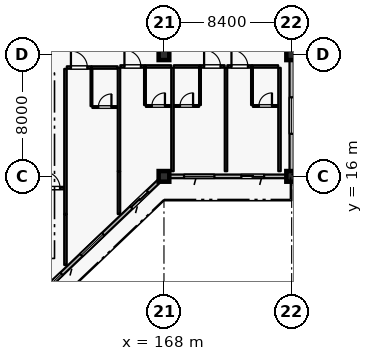
"""IFC4 building model, lengths in metres.
Left out: names, types, materials, properties, quantities, classifications, styles, units other than length and angle.
Written with IfcOpenShell. Run it as: python <this file> out.ifc"""

import sys

from ifc_helpers import new_model, si_unit, direction, frame, frame_2d, origin, origin_2d, place, context, subcontext, project, spatial, rectangle, extrude, element, fill, save


model = new_model("IFC4")
c1 = context("Model", 3, precision=1e-05, world=origin(), true_north=direction((0.0, 1.0)))
c2 = subcontext(c1, "Body", "Model", "MODEL_VIEW")
j1 = project(units=[si_unit("LENGTHUNIT", "METRE"), si_unit("PLANEANGLEUNIT", "RADIAN")], contexts=[c1])
p1 = place(None, origin())
s1 = spatial("IfcSite", under=j1, at=p1, CompositionType="ELEMENT")
p2 = place(p1, origin())
s2 = spatial("IfcBuilding", under=s1, at=p2, CompositionType="ELEMENT")
p3 = place(p2, frame((0.0, 0.0, 28.8)))
s3 = spatial("IfcBuildingStorey", under=s2, at=p3, CompositionType="ELEMENT", Elevation=28.8)
for number, where, z_axis, x_axis in (
    (1, (168.0, 16.0, 0.0), (0.0, 0.0, 1.0), (1.0, 0.0, 0.0)),
    (2, (176.4, 16.0, 0.0), (0.0, 0.0, 1.0), (1.0, 0.0, 0.0)),
    (3, (168.0, 24.0, 0.0), (0.0, 0.0, 1.0), (1.0, 0.0, 0.0)),
    (4, (176.4, 24.0, 0.0), (0.0, 0.0, 1.0), (1.0, 0.0, 0.0)),
):
    element("IfcColumn", number, at=place(p3, frame(where, z_axis=z_axis, x_axis=x_axis)), inside=s3, PredefinedType="COLUMN", context=c2, shape_type="SweptSolid", body=[
        extrude(rectangle(XDim=0.7, YDim=0.7, at=origin_2d()), origin(), (0.0, 0.0, 1.0), 3.6),
    ])
p4 = place(p3, frame((167.65, 15.667, 0.0), z_axis=(0.0, 0.0, 1.0), x_axis=(-0.724105170588, -0.689689569247, 0.0)))
e5 = element("IfcWall", 5, at=p4, inside=s3, PredefinedType="SOLIDWALL", context=c2, shape_type="SweptSolid", body=[
    extrude(rectangle(XDim=10.634, YDim=0.24, at=frame_2d((5.317, 0.0))), origin(), (0.0, 0.0, 1.0), 2.93),
])
p5 = place(p4, frame((0.983, 0.0, 0.0)))
e6 = element("IfcOpeningElement", 6, at=p5, cuts=e5, PredefinedType="OPENING", context=c2, shape_type="SweptSolid", body=[
    extrude(rectangle(XDim=1.5, YDim=2.25, at=frame_2d((0.75, 1.125))), frame((0.0, 0.13, 0.0), z_axis=(0.0, -1.0, 0.0), x_axis=(1.0, 0.0, 0.0)), (0.0, 0.0, 1.0), 0.26),
])
p6 = place(p4, frame((5.035, 0.0, 0.8)))
e7 = element("IfcOpeningElement", 7, at=p6, cuts=e5, PredefinedType="OPENING", context=c2, shape_type="SweptSolid", body=[
    extrude(rectangle(XDim=2.0, YDim=1.75, at=frame_2d((1.0, 0.875))), frame((0.0, 0.13, 0.0), z_axis=(0.0, -1.0, 0.0), x_axis=(1.0, 0.0, 0.0)), (0.0, 0.0, 1.0), 0.26),
])
p7 = place(p4, frame((8.819, 0.0, 0.8)))
e8 = element("IfcOpeningElement", 8, at=p7, cuts=e5, PredefinedType="OPENING", context=c2, shape_type="SweptSolid", body=[
    extrude(rectangle(XDim=1.6, YDim=1.6, at=frame_2d((0.8, 0.8))), frame((0.0, 0.13, 0.0), z_axis=(0.0, -1.0, 0.0), x_axis=(1.0, 0.0, 0.0)), (0.0, 0.0, 1.0), 0.26),
])
p8 = place(p3, frame((176.05, 16.0, 0.0), z_axis=(0.0, 0.0, 1.0), x_axis=(-1.0, 0.0, 0.0)))
e9 = element("IfcWall", 9, at=p8, inside=s3, PredefinedType="SOLIDWALL", context=c2, shape_type="SweptSolid", body=[
    extrude(rectangle(XDim=7.7, YDim=0.24, at=frame_2d((3.85, 0.0))), origin(), (0.0, 0.0, 1.0), 2.93),
])
p9 = place(p8, frame((1.46, 0.0, 0.0)))
e10 = element("IfcOpeningElement", 10, at=p9, cuts=e9, PredefinedType="OPENING", context=c2, shape_type="SweptSolid", body=[
    extrude(rectangle(XDim=1.5, YDim=2.25, at=frame_2d((0.75, 1.125))), frame((0.0, 0.13, 0.0), z_axis=(0.0, -1.0, 0.0), x_axis=(1.0, 0.0, 0.0)), (0.0, 0.0, 1.0), 0.26),
])
p10 = place(p8, frame((4.73, 0.0, 0.8)))
e11 = element("IfcOpeningElement", 11, at=p10, cuts=e9, PredefinedType="OPENING", context=c2, shape_type="SweptSolid", body=[
    extrude(rectangle(XDim=2.0, YDim=1.75, at=frame_2d((1.0, 0.875))), frame((0.0, 0.13, 0.0), z_axis=(0.0, -1.0, 0.0), x_axis=(1.0, 0.0, 0.0)), (0.0, 0.0, 1.0), 0.26),
])
p11 = place(p3, frame((176.4, 23.65, 0.0), z_axis=(0.0, 0.0, 1.0), x_axis=(0.0, -1.0, 0.0)))
e12 = element("IfcWall", 12, at=p11, inside=s3, PredefinedType="SOLIDWALL", context=c2, shape_type="SweptSolid", body=[
    extrude(rectangle(XDim=7.3, YDim=0.28, at=frame_2d((3.65, 0.0))), origin(), (0.0, 0.0, 1.0), 2.7),
])
p12 = place(p11, frame((2.45, 0.0, 0.5)))
e13 = element("IfcOpeningElement", 13, at=p12, cuts=e12, PredefinedType="OPENING", context=c2, shape_type="SweptSolid", body=[
    extrude(rectangle(XDim=2.4, YDim=1.65, at=frame_2d((1.2, 0.825))), frame((0.0, 0.15, 0.0), z_axis=(0.0, -1.0, 0.0), x_axis=(1.0, 0.0, 0.0)), (0.0, 0.0, 1.0), 0.3),
])
p13 = place(p3, frame((159.81, 15.23, 0.0), z_axis=(0.0, 0.0, 1.0), x_axis=(1.0, 0.0, 0.0)))
e14 = element("IfcWall", 14, at=p13, inside=s3, PredefinedType="PARTITIONING", context=c2, shape_type="SweptSolid", body=[
    extrude(rectangle(XDim=1.62, YDim=0.16, at=frame_2d((0.81, 0.0))), origin(), (0.0, 0.0, 1.0), 3.365),
])
p14 = place(p13, frame((0.27, 0.0, 0.0)))
e15 = element("IfcOpeningElement", 15, at=p14, cuts=e14, PredefinedType="OPENING", context=c2, shape_type="SweptSolid", body=[
    extrude(rectangle(XDim=1.08, YDim=2.3, at=frame_2d((0.54, 1.15))), frame((0.0, 0.09, 0.0), z_axis=(0.0, -1.0, 0.0), x_axis=(1.0, 0.0, 0.0)), (0.0, 0.0, 1.0), 0.18),
])
p15 = place(p3, frame((161.52, 10.17, 0.0), z_axis=(0.0, 0.0, 1.0), x_axis=(0.0, 1.0, 0.0)))
e16 = element("IfcWall", 16, at=p15, inside=s3, PredefinedType="PARTITIONING", context=c2, shape_type="SweptSolid", body=[
    extrude(rectangle(XDim=3.34, YDim=0.16, at=frame_2d((1.67, 0.0))), origin(), (0.0, 0.0, 1.0), 3.365),
])
p16 = place(p3, frame((161.61, 23.16, 0.0), z_axis=(0.0, 0.0, 1.0), x_axis=(1.0, 0.0, 0.0)))
e17 = element("IfcWall", 17, at=p16, inside=s3, PredefinedType="PARTITIONING", context=c2, shape_type="SweptSolid", body=[
    extrude(rectangle(XDim=1.62, YDim=0.16, at=frame_2d((0.81, 0.0))), origin(), (0.0, 0.0, 1.0), 3.365),
])
p17 = place(p16, frame((0.27, 0.0, 0.0)))
e18 = element("IfcOpeningElement", 18, at=p17, cuts=e17, PredefinedType="OPENING", context=c2, shape_type="SweptSolid", body=[
    extrude(rectangle(XDim=1.08, YDim=2.3, at=frame_2d((0.54, 1.15))), frame((0.0, 0.09, 0.0), z_axis=(0.0, -1.0, 0.0), x_axis=(1.0, 0.0, 0.0)), (0.0, 0.0, 1.0), 0.18),
])
p18 = place(p3, frame((163.24, 23.16, 0.0), z_axis=(0.0, 0.0, 1.0), x_axis=(1.0, 0.0, 0.0)))
e19 = element("IfcWall", 19, at=p18, inside=s3, PredefinedType="PARTITIONING", context=c2, shape_type="SweptSolid", body=[
    extrude(rectangle(XDim=1.71, YDim=0.16, at=frame_2d((0.855, 0.0))), origin(), (0.0, 0.0, 1.0), 3.365),
])
p19 = place(p3, frame((163.23, 20.62, 0.0), z_axis=(0.0, 0.0, 1.0), x_axis=(0.0, 1.0, 0.0)))
e20 = element("IfcWall", 20, at=p19, inside=s3, PredefinedType="PARTITIONING", context=c2, shape_type="SweptSolid", body=[
    extrude(rectangle(XDim=2.45, YDim=0.115, at=frame_2d((1.225, 0.0))), origin(), (0.0, 0.0, 1.0), 3.365),
])
p20 = place(p3, frame((163.29, 20.56, 0.0), z_axis=(0.0, 0.0, 1.0), x_axis=(1.0, 0.0, 0.0)))
e21 = element("IfcWall", 21, at=p20, inside=s3, PredefinedType="PARTITIONING", context=c2, shape_type="SweptSolid", body=[
    extrude(rectangle(XDim=1.65, YDim=0.115, at=frame_2d((0.825, 0.0))), origin(), (0.0, 0.0, 1.0), 3.365),
])
p21 = place(p20, frame((0.395, 0.0, 0.0)))
e22 = element("IfcOpeningElement", 22, at=p21, cuts=e21, PredefinedType="OPENING", context=c2, shape_type="SweptSolid", body=[
    extrude(rectangle(XDim=0.86, YDim=2.12, at=frame_2d((0.43, 1.06))), frame((0.0, 0.067, 0.0), z_axis=(0.0, -1.0, 0.0), x_axis=(1.0, 0.0, 0.0)), (0.0, 0.0, 1.0), 0.135),
])
p22 = place(p3, frame((161.52, 13.52, 0.0), z_axis=(0.0, 0.0, 1.0), x_axis=(0.0, 1.0, 0.0)))
e23 = element("IfcWall", 23, at=p22, inside=s3, PredefinedType="PARTITIONING", context=c2, shape_type="SweptSolid", body=[
    extrude(rectangle(XDim=9.55, YDim=0.16, at=frame_2d((4.775, 0.0))), origin(), (0.0, 0.0, 1.0), 3.365),
])
p23 = place(p3, frame((165.04, 13.52, 0.0), z_axis=(0.0, 0.0, 1.0), x_axis=(0.0, 1.0, 0.0)))
e24 = element("IfcWall", 24, at=p23, inside=s3, PredefinedType="PARTITIONING", context=c2, shape_type="SweptSolid", body=[
    extrude(rectangle(XDim=2.81, YDim=0.16, at=frame_2d((1.405, 0.0))), origin(), (0.0, 0.0, 1.0), 3.365),
])
p24 = place(p3, frame((165.13, 23.23, 0.0), z_axis=(0.0, 0.0, 1.0), x_axis=(1.0, 0.0, 0.0)))
e25 = element("IfcWall", 25, at=p24, inside=s3, PredefinedType="PARTITIONING", context=c2, shape_type="SweptSolid", body=[
    extrude(rectangle(XDim=1.62, YDim=0.16, at=frame_2d((0.81, 0.0))), origin(), (0.0, 0.0, 1.0), 3.365),
])
p25 = place(p24, frame((0.27, 0.0, 0.0)))
e26 = element("IfcOpeningElement", 26, at=p25, cuts=e25, PredefinedType="OPENING", context=c2, shape_type="SweptSolid", body=[
    extrude(rectangle(XDim=1.08, YDim=2.3, at=frame_2d((0.54, 1.15))), frame((0.0, 0.09, 0.0), z_axis=(0.0, -1.0, 0.0), x_axis=(1.0, 0.0, 0.0)), (0.0, 0.0, 1.0), 0.18),
])
p26 = place(p3, frame((166.76, 23.23, 0.0), z_axis=(0.0, 0.0, 1.0), x_axis=(1.0, 0.0, 0.0)))
e27 = element("IfcWall", 27, at=p26, inside=s3, PredefinedType="PARTITIONING", context=c2, shape_type="SweptSolid", body=[
    extrude(rectangle(XDim=1.71, YDim=0.16, at=frame_2d((0.855, 0.0))), origin(), (0.0, 0.0, 1.0), 3.365),
])
p27 = place(p3, frame((166.75, 20.69, 0.0), z_axis=(0.0, 0.0, 1.0), x_axis=(0.0, 1.0, 0.0)))
e28 = element("IfcWall", 28, at=p27, inside=s3, PredefinedType="PARTITIONING", context=c2, shape_type="SweptSolid", body=[
    extrude(rectangle(XDim=2.45, YDim=0.115, at=frame_2d((1.225, 0.0))), origin(), (0.0, 0.0, 1.0), 3.365),
])
p28 = place(p3, frame((166.81, 20.63, 0.0), z_axis=(0.0, 0.0, 1.0), x_axis=(1.0, 0.0, 0.0)))
e29 = element("IfcWall", 29, at=p28, inside=s3, PredefinedType="PARTITIONING", context=c2, shape_type="SweptSolid", body=[
    extrude(rectangle(XDim=1.65, YDim=0.115, at=frame_2d((0.825, 0.0))), origin(), (0.0, 0.0, 1.0), 3.365),
])
p29 = place(p28, frame((0.395, 0.0, 0.0)))
e30 = element("IfcOpeningElement", 30, at=p29, cuts=e29, PredefinedType="OPENING", context=c2, shape_type="SweptSolid", body=[
    extrude(rectangle(XDim=0.86, YDim=2.12, at=frame_2d((0.43, 1.06))), frame((0.0, 0.067, 0.0), z_axis=(0.0, -1.0, 0.0), x_axis=(1.0, 0.0, 0.0)), (0.0, 0.0, 1.0), 0.135),
])
p30 = place(p3, frame((165.04, 16.34, 0.0), z_axis=(0.0, 0.0, 1.0), x_axis=(0.0, 1.0, 0.0)))
e31 = element("IfcWall", 31, at=p30, inside=s3, PredefinedType="PARTITIONING", context=c2, shape_type="SweptSolid", body=[
    extrude(rectangle(XDim=6.8, YDim=0.16, at=frame_2d((3.4, 0.0))), origin(), (0.0, 0.0, 1.0), 3.365),
])
p31 = place(p3, frame((168.65, 23.23, 0.0), z_axis=(0.0, 0.0, 1.0), x_axis=(1.0, 0.0, 0.0)))
e32 = element("IfcWall", 32, at=p31, inside=s3, PredefinedType="PARTITIONING", context=c2, shape_type="SweptSolid", body=[
    extrude(rectangle(XDim=1.71, YDim=0.16, at=frame_2d((0.855, 0.0))), origin(), (0.0, 0.0, 1.0), 3.365),
])
p32 = place(p3, frame((170.37, 23.23, 0.0), z_axis=(0.0, 0.0, 1.0), x_axis=(1.0, 0.0, 0.0)))
e33 = element("IfcWall", 33, at=p32, inside=s3, PredefinedType="PARTITIONING", context=c2, shape_type="SweptSolid", body=[
    extrude(rectangle(XDim=1.62, YDim=0.16, at=frame_2d((0.81, 0.0))), origin(), (0.0, 0.0, 1.0), 3.365),
])
p33 = place(p32, frame((0.27, 0.0, 0.0)))
e34 = element("IfcOpeningElement", 34, at=p33, cuts=e33, PredefinedType="OPENING", context=c2, shape_type="SweptSolid", body=[
    extrude(rectangle(XDim=1.08, YDim=2.3, at=frame_2d((0.54, 1.15))), frame((0.0, 0.09, 0.0), z_axis=(0.0, -1.0, 0.0), x_axis=(1.0, 0.0, 0.0)), (0.0, 0.0, 1.0), 0.18),
])
p34 = place(p3, frame((170.37, 20.69, 0.0), z_axis=(0.0, 0.0, 1.0), x_axis=(0.0, 1.0, 0.0)))
e35 = element("IfcWall", 35, at=p34, inside=s3, PredefinedType="PARTITIONING", context=c2, shape_type="SweptSolid", body=[
    extrude(rectangle(XDim=2.45, YDim=0.115, at=frame_2d((1.225, 0.0))), origin(), (0.0, 0.0, 1.0), 3.365),
])
p35 = place(p3, frame((168.66, 20.63, 0.0), z_axis=(0.0, 0.0, 1.0), x_axis=(1.0, 0.0, 0.0)))
e36 = element("IfcWall", 36, at=p35, inside=s3, PredefinedType="PARTITIONING", context=c2, shape_type="SweptSolid", body=[
    extrude(rectangle(XDim=1.65, YDim=0.115, at=frame_2d((0.825, 0.0))), origin(), (0.0, 0.0, 1.0), 3.365),
])
p36 = place(p35, frame((0.395, 0.0, 0.0)))
e37 = element("IfcOpeningElement", 37, at=p36, cuts=e36, PredefinedType="OPENING", context=c2, shape_type="SweptSolid", body=[
    extrude(rectangle(XDim=0.86, YDim=2.12, at=frame_2d((0.43, 1.06))), frame((0.0, 0.067, 0.0), z_axis=(0.0, -1.0, 0.0), x_axis=(1.0, 0.0, 0.0)), (0.0, 0.0, 1.0), 0.135),
])
p37 = place(p3, frame((168.56, 16.34, 0.0), z_axis=(0.0, 0.0, 1.0), x_axis=(0.0, 1.0, 0.0)))
e38 = element("IfcWall", 38, at=p37, inside=s3, PredefinedType="PARTITIONING", context=c2, shape_type="SweptSolid", body=[
    extrude(rectangle(XDim=6.8, YDim=0.16, at=frame_2d((3.4, 0.0))), origin(), (0.0, 0.0, 1.0), 3.365),
])
p38 = place(p3, frame((172.17, 23.23, 0.0), z_axis=(0.0, 0.0, 1.0), x_axis=(1.0, 0.0, 0.0)))
e39 = element("IfcWall", 39, at=p38, inside=s3, PredefinedType="PARTITIONING", context=c2, shape_type="SweptSolid", body=[
    extrude(rectangle(XDim=1.62, YDim=0.16, at=frame_2d((0.81, 0.0))), origin(), (0.0, 0.0, 1.0), 3.365),
])
p39 = place(p38, frame((0.27, 0.0, 0.0)))
e40 = element("IfcOpeningElement", 40, at=p39, cuts=e39, PredefinedType="OPENING", context=c2, shape_type="SweptSolid", body=[
    extrude(rectangle(XDim=1.08, YDim=2.3, at=frame_2d((0.54, 1.15))), frame((0.0, 0.09, 0.0), z_axis=(0.0, -1.0, 0.0), x_axis=(1.0, 0.0, 0.0)), (0.0, 0.0, 1.0), 0.18),
])
p40 = place(p3, frame((173.8, 23.23, 0.0), z_axis=(0.0, 0.0, 1.0), x_axis=(1.0, 0.0, 0.0)))
e41 = element("IfcWall", 41, at=p40, inside=s3, PredefinedType="PARTITIONING", context=c2, shape_type="SweptSolid", body=[
    extrude(rectangle(XDim=1.71, YDim=0.16, at=frame_2d((0.855, 0.0))), origin(), (0.0, 0.0, 1.0), 3.365),
])
p41 = place(p3, frame((173.79, 20.69, 0.0), z_axis=(0.0, 0.0, 1.0), x_axis=(0.0, 1.0, 0.0)))
e42 = element("IfcWall", 42, at=p41, inside=s3, PredefinedType="PARTITIONING", context=c2, shape_type="SweptSolid", body=[
    extrude(rectangle(XDim=2.45, YDim=0.115, at=frame_2d((1.225, 0.0))), origin(), (0.0, 0.0, 1.0), 3.365),
])
p42 = place(p3, frame((173.85, 20.63, 0.0), z_axis=(0.0, 0.0, 1.0), x_axis=(1.0, 0.0, 0.0)))
e43 = element("IfcWall", 43, at=p42, inside=s3, PredefinedType="PARTITIONING", context=c2, shape_type="SweptSolid", body=[
    extrude(rectangle(XDim=1.65, YDim=0.115, at=frame_2d((0.825, 0.0))), origin(), (0.0, 0.0, 1.0), 3.365),
])
p43 = place(p42, frame((0.395, 0.0, 0.0)))
e44 = element("IfcOpeningElement", 44, at=p43, cuts=e43, PredefinedType="OPENING", context=c2, shape_type="SweptSolid", body=[
    extrude(rectangle(XDim=0.86, YDim=2.12, at=frame_2d((0.43, 1.06))), frame((0.0, 0.067, 0.0), z_axis=(0.0, -1.0, 0.0), x_axis=(1.0, 0.0, 0.0)), (0.0, 0.0, 1.0), 0.135),
])
for number, where, z_axis, x_axis in (
    (45, (172.08, 16.34, 0.0), (0.0, 0.0, 1.0), (0.0, 1.0, 0.0)),
    (46, (175.6, 16.34, 0.0), (0.0, 0.0, 1.0), (0.0, 1.0, 0.0)),
):
    element("IfcWall", number, at=place(p3, frame(where, z_axis=z_axis, x_axis=x_axis)), inside=s3, PredefinedType="PARTITIONING", context=c2, shape_type="SweptSolid", body=[
        extrude(rectangle(XDim=6.8, YDim=0.16, at=frame_2d((3.4, 0.0))), origin(), (0.0, 0.0, 1.0), 3.365),
    ])
p44 = place(p5, origin())
e47 = element("IfcDoor", 47, at=p44, inside=s3, OperationType="SLIDING_TO_LEFT", PredefinedType="DOOR", context=c2, shape_type="SweptSolid", body=[
    extrude(rectangle(XDim=1.5, YDim=2.25, at=frame_2d((0.75, 1.125))), frame((0.0, 0.025, 0.0), z_axis=(0.0, -1.0, 0.0), x_axis=(1.0, 0.0, 0.0)), (0.0, 0.0, 1.0), 0.05),
])
fill(e6, e47)
p45 = place(p6, origin())
e48 = element("IfcWindow", 48, at=p45, inside=s3, PartitioningType="DOUBLE_PANEL_VERTICAL", PredefinedType="WINDOW", context=c2, shape_type="SweptSolid", body=[
    extrude(rectangle(XDim=2.0, YDim=1.75, at=frame_2d((1.0, 0.875))), frame((0.0, 0.03, 0.0), z_axis=(0.0, -1.0, 0.0), x_axis=(1.0, 0.0, 0.0)), (0.0, 0.0, 1.0), 0.06),
])
fill(e7, e48)
p46 = place(p7, origin())
e49 = element("IfcWindow", 49, at=p46, inside=s3, PartitioningType="SINGLE_PANEL", PredefinedType="WINDOW", context=c2, shape_type="SweptSolid", body=[
    extrude(rectangle(XDim=1.6, YDim=1.6, at=frame_2d((0.8, 0.8))), frame((0.0, 0.03, 0.0), z_axis=(0.0, -1.0, 0.0), x_axis=(1.0, 0.0, 0.0)), (0.0, 0.0, 1.0), 0.06),
])
fill(e8, e49)
p47 = place(p9, origin())
e50 = element("IfcDoor", 50, at=p47, inside=s3, OperationType="SLIDING_TO_LEFT", PredefinedType="DOOR", context=c2, shape_type="SweptSolid", body=[
    extrude(rectangle(XDim=1.5, YDim=2.25, at=frame_2d((0.75, 1.125))), frame((0.0, 0.025, 0.0), z_axis=(0.0, -1.0, 0.0), x_axis=(1.0, 0.0, 0.0)), (0.0, 0.0, 1.0), 0.05),
])
fill(e10, e50)
p48 = place(p10, origin())
e51 = element("IfcWindow", 51, at=p48, inside=s3, PartitioningType="DOUBLE_PANEL_VERTICAL", PredefinedType="WINDOW", context=c2, shape_type="SweptSolid", body=[
    extrude(rectangle(XDim=2.0, YDim=1.75, at=frame_2d((1.0, 0.875))), frame((0.0, 0.03, 0.0), z_axis=(0.0, -1.0, 0.0), x_axis=(1.0, 0.0, 0.0)), (0.0, 0.0, 1.0), 0.06),
])
fill(e11, e51)
p49 = place(p12, origin())
e52 = element("IfcWindow", 52, at=p49, inside=s3, PartitioningType="DOUBLE_PANEL_VERTICAL", PredefinedType="WINDOW", context=c2, shape_type="SweptSolid", body=[
    extrude(rectangle(XDim=2.4, YDim=1.65, at=frame_2d((1.2, 0.825))), frame((0.0, 0.03, 0.0), z_axis=(0.0, -1.0, 0.0), x_axis=(1.0, 0.0, 0.0)), (0.0, 0.0, 1.0), 0.06),
])
fill(e13, e52)
p50 = place(p14, origin())
e53 = element("IfcDoor", 53, at=p50, inside=s3, OperationType="SINGLE_SWING_LEFT", PredefinedType="DOOR", context=c2, shape_type="SweptSolid", body=[
    extrude(rectangle(XDim=1.08, YDim=2.3, at=frame_2d((0.54, 1.15))), frame((0.0, 0.025, 0.0), z_axis=(0.0, -1.0, 0.0), x_axis=(1.0, 0.0, 0.0)), (0.0, 0.0, 1.0), 0.05),
])
fill(e15, e53)
p51 = place(p17, origin())
e54 = element("IfcDoor", 54, at=p51, inside=s3, OperationType="SINGLE_SWING_LEFT", PredefinedType="DOOR", context=c2, shape_type="SweptSolid", body=[
    extrude(rectangle(XDim=1.08, YDim=2.3, at=frame_2d((0.54, 1.15))), frame((0.0, 0.025, 0.0), z_axis=(0.0, -1.0, 0.0), x_axis=(1.0, 0.0, 0.0)), (0.0, 0.0, 1.0), 0.05),
])
fill(e18, e54)
p52 = place(p21, origin())
e55 = element("IfcDoor", 55, at=p52, inside=s3, OperationType="SINGLE_SWING_RIGHT", PredefinedType="DOOR", context=c2, shape_type="SweptSolid", body=[
    extrude(rectangle(XDim=0.86, YDim=2.12, at=frame_2d((0.43, 1.06))), frame((0.0, 0.025, 0.0), z_axis=(0.0, -1.0, 0.0), x_axis=(1.0, 0.0, 0.0)), (0.0, 0.0, 1.0), 0.05),
])
fill(e22, e55)
p53 = place(p25, origin())
e56 = element("IfcDoor", 56, at=p53, inside=s3, OperationType="SINGLE_SWING_LEFT", PredefinedType="DOOR", context=c2, shape_type="SweptSolid", body=[
    extrude(rectangle(XDim=1.08, YDim=2.3, at=frame_2d((0.54, 1.15))), frame((0.0, 0.025, 0.0), z_axis=(0.0, -1.0, 0.0), x_axis=(1.0, 0.0, 0.0)), (0.0, 0.0, 1.0), 0.05),
])
fill(e26, e56)
p54 = place(p29, origin())
e57 = element("IfcDoor", 57, at=p54, inside=s3, OperationType="SINGLE_SWING_RIGHT", PredefinedType="DOOR", context=c2, shape_type="SweptSolid", body=[
    extrude(rectangle(XDim=0.86, YDim=2.12, at=frame_2d((0.43, 1.06))), frame((0.0, 0.025, 0.0), z_axis=(0.0, -1.0, 0.0), x_axis=(1.0, 0.0, 0.0)), (0.0, 0.0, 1.0), 0.05),
])
fill(e30, e57)
p55 = place(p33, origin())
e58 = element("IfcDoor", 58, at=p55, inside=s3, OperationType="SINGLE_SWING_LEFT", PredefinedType="DOOR", context=c2, shape_type="SweptSolid", body=[
    extrude(rectangle(XDim=1.08, YDim=2.3, at=frame_2d((0.54, 1.15))), frame((0.0, 0.025, 0.0), z_axis=(0.0, -1.0, 0.0), x_axis=(1.0, 0.0, 0.0)), (0.0, 0.0, 1.0), 0.05),
])
fill(e34, e58)
p56 = place(p36, origin())
e59 = element("IfcDoor", 59, at=p56, inside=s3, OperationType="SINGLE_SWING_RIGHT", PredefinedType="DOOR", context=c2, shape_type="SweptSolid", body=[
    extrude(rectangle(XDim=0.86, YDim=2.12, at=frame_2d((0.43, 1.06))), frame((0.0, 0.025, 0.0), z_axis=(0.0, -1.0, 0.0), x_axis=(1.0, 0.0, 0.0)), (0.0, 0.0, 1.0), 0.05),
])
fill(e37, e59)
p57 = place(p39, origin())
e60 = element("IfcDoor", 60, at=p57, inside=s3, OperationType="SINGLE_SWING_LEFT", PredefinedType="DOOR", context=c2, shape_type="SweptSolid", body=[
    extrude(rectangle(XDim=1.08, YDim=2.3, at=frame_2d((0.54, 1.15))), frame((0.0, 0.025, 0.0), z_axis=(0.0, -1.0, 0.0), x_axis=(1.0, 0.0, 0.0)), (0.0, 0.0, 1.0), 0.05),
])
fill(e40, e60)
p58 = place(p43, origin())
e61 = element("IfcDoor", 61, at=p58, inside=s3, OperationType="SINGLE_SWING_RIGHT", PredefinedType="DOOR", context=c2, shape_type="SweptSolid", body=[
    extrude(rectangle(XDim=0.86, YDim=2.12, at=frame_2d((0.43, 1.06))), frame((0.0, 0.025, 0.0), z_axis=(0.0, -1.0, 0.0), x_axis=(1.0, 0.0, 0.0)), (0.0, 0.0, 1.0), 0.05),
])
fill(e44, e61)
save(model, sys.argv[1])
